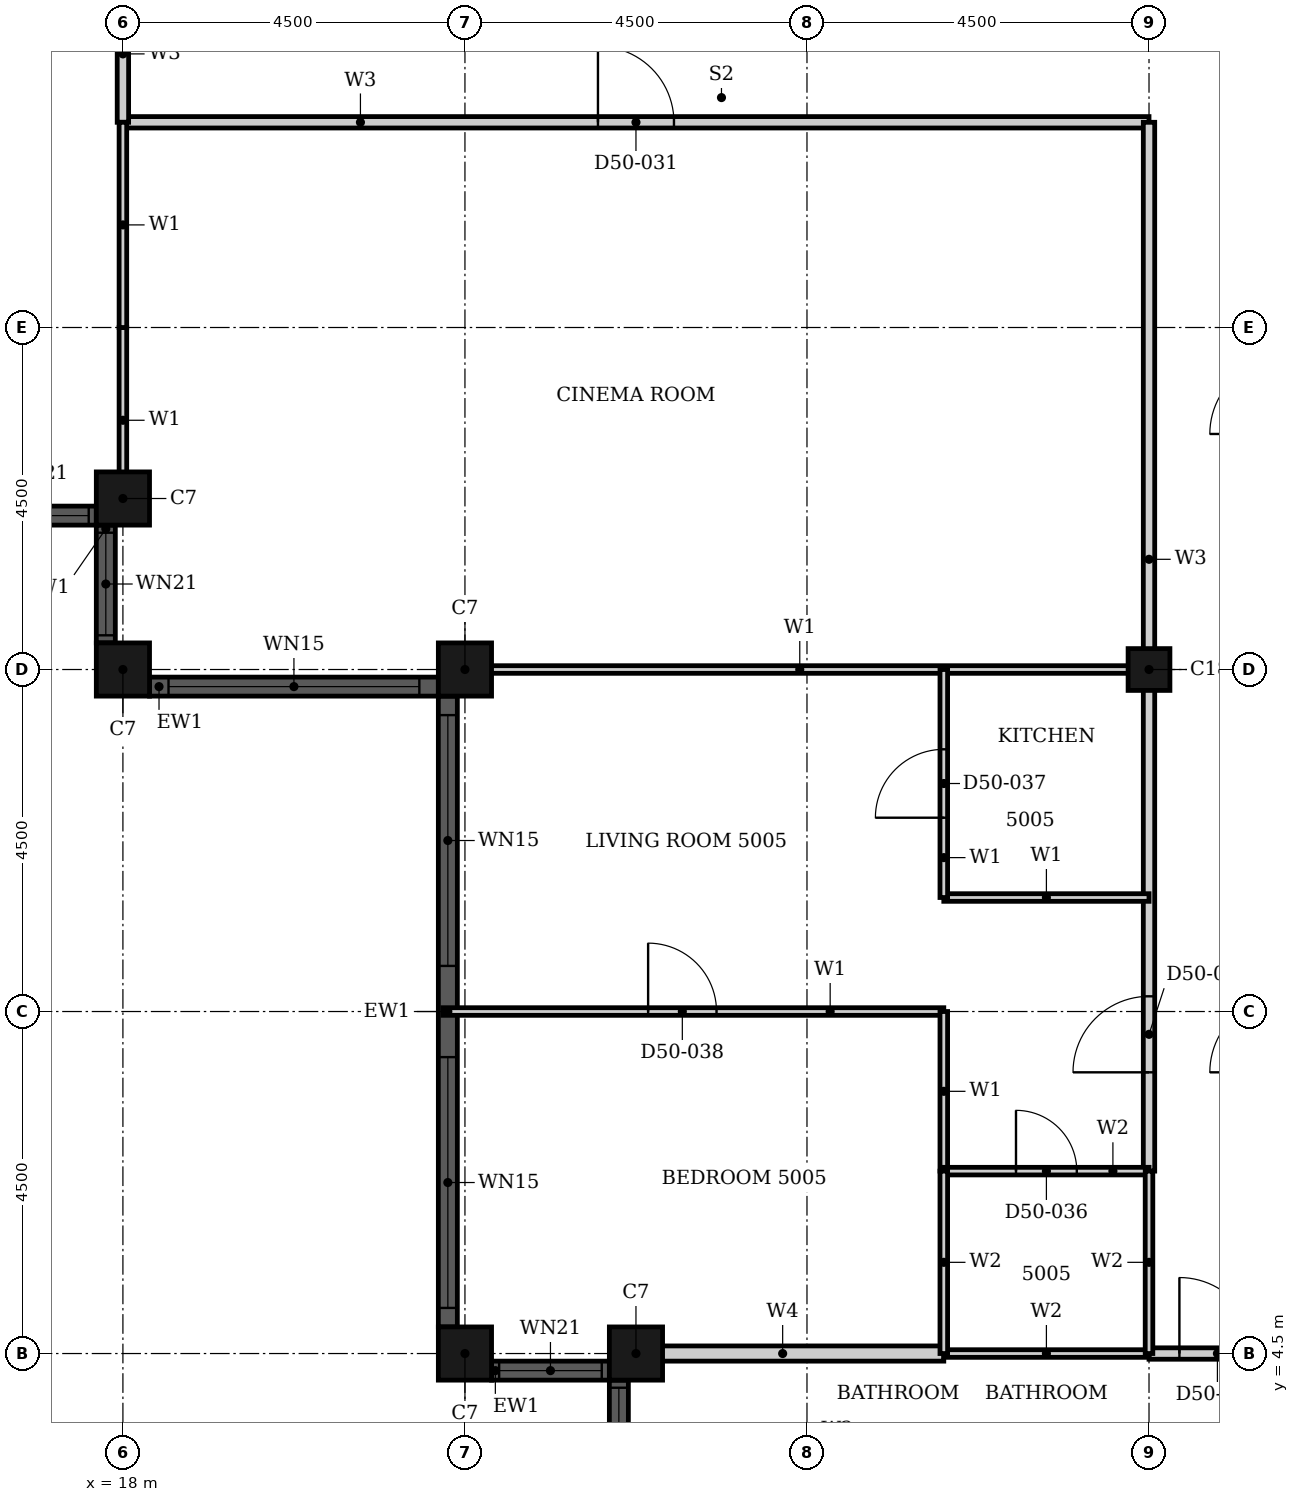
"""IFC4 building model, lengths in metres.
Left out: names, types, materials, properties, quantities, classifications, styles, units other than length and angle.
Written with IfcOpenShell. Run it as: python <this file> out.ifc"""

import sys

from ifc_helpers import new_model, si_unit, direction, frame, frame_2d, origin, origin_2d, place, context, subcontext, project, spatial, rectangle, hollow_rectangle, extrude, element, fill, save


model = new_model("IFC4")
c1 = context("Model", 3, precision=1e-05, world=origin(), true_north=direction((0.0, 1.0)))
c2 = subcontext(c1, "Body", "Model", "MODEL_VIEW")
j1 = project(units=[si_unit("LENGTHUNIT", "METRE"), si_unit("PLANEANGLEUNIT", "RADIAN")], contexts=[c1])
p1 = place(None, origin())
s1 = spatial("IfcSite", under=j1, at=p1, CompositionType="ELEMENT")
p2 = place(p1, origin())
s2 = spatial("IfcBuilding", under=s1, at=p2, CompositionType="ELEMENT")
p3 = place(p2, frame((0.0, 0.0, 199.8)))
s3 = spatial("IfcBuildingStorey", under=s2, at=p3, CompositionType="ELEMENT", Elevation=199.8)
for number, where, z_axis, x_axis in (
    (1, (18.0, 15.75, 0.0), (0.0, 0.0, 1.0), (1.0, 0.0, 0.0)),
    (2, (18.0, 13.5, 0.0), (0.0, 0.0, 1.0), (1.0, 0.0, 0.0)),
    (3, (22.5, 13.5, 0.0), (0.0, 0.0, 1.0), (1.0, 0.0, 0.0)),
    (4, (22.5, 4.5, 0.0), (0.0, 0.0, 1.0), (1.0, 0.0, 0.0)),
    (5, (24.75, 4.5, 0.0), (0.0, 0.0, 1.0), (1.0, 0.0, 0.0)),
):
    element("IfcColumn", number, at=place(p3, frame(where, z_axis=z_axis, x_axis=x_axis)), inside=s3, PredefinedType="COLUMN", context=c2, shape_type="SweptSolid", body=[
        extrude(hollow_rectangle(XDim=0.7, YDim=0.7, WallThickness=0.022, at=origin_2d()), origin(), (0.0, 0.0, 1.0), 3.7),
    ])
p4 = place(p3, frame((31.5, 13.5, 0.0), z_axis=(0.0, 0.0, 1.0), x_axis=(1.0, 0.0, 0.0)))
e6 = element("IfcColumn", 6, at=p4, inside=s3, PredefinedType="COLUMN", context=c2, shape_type="SweptSolid", body=[
    extrude(hollow_rectangle(XDim=0.55, YDim=0.55, WallThickness=0.018, at=origin_2d()), origin(), (0.0, 0.0, 1.0), 3.7),
])
p5 = place(p3, frame((16.1, 15.525, 0.0), z_axis=(0.0, 0.0, 1.0), x_axis=(1.0, 0.0, 0.0)))
e7 = element("IfcWall", 7, at=p5, inside=s3, PredefinedType="SOLIDWALL", context=c2, shape_type="SweptSolid", body=[
    extrude(rectangle(XDim=1.55, YDim=0.25, at=frame_2d((0.775, 0.0))), origin(), (0.0, 0.0, 1.0), 3.7),
])
p6 = place(p5, frame((0.1, 0.0, 0.9)))
e8 = element("IfcOpeningElement", 8, at=p6, cuts=e7, PredefinedType="OPENING", context=c2, shape_type="SweptSolid", body=[
    extrude(rectangle(XDim=1.35, YDim=1.85, at=frame_2d((0.675, 0.925))), frame((0.0, 0.135, 0.0), z_axis=(0.0, -1.0, 0.0), x_axis=(1.0, 0.0, 0.0)), (0.0, 0.0, 1.0), 0.27),
])
p7 = place(p3, frame((17.775, 15.4, 0.0), z_axis=(0.0, 0.0, 1.0), x_axis=(0.0, -1.0, 0.0)))
e9 = element("IfcWall", 9, at=p7, inside=s3, PredefinedType="SOLIDWALL", context=c2, shape_type="SweptSolid", body=[
    extrude(rectangle(XDim=1.55, YDim=0.25, at=frame_2d((0.775, 0.0))), origin(), (0.0, 0.0, 1.0), 3.7),
])
p8 = place(p7, frame((0.1, 0.0, 0.9)))
e10 = element("IfcOpeningElement", 10, at=p8, cuts=e9, PredefinedType="OPENING", context=c2, shape_type="SweptSolid", body=[
    extrude(rectangle(XDim=1.35, YDim=1.85, at=frame_2d((0.675, 0.925))), frame((0.0, 0.135, 0.0), z_axis=(0.0, -1.0, 0.0), x_axis=(1.0, 0.0, 0.0)), (0.0, 0.0, 1.0), 0.27),
])
p9 = place(p3, frame((18.35, 13.275, 0.0), z_axis=(0.0, 0.0, 1.0), x_axis=(1.0, 0.0, 0.0)))
e11 = element("IfcWall", 11, at=p9, inside=s3, PredefinedType="SOLIDWALL", context=c2, shape_type="SweptSolid", body=[
    extrude(rectangle(XDim=3.8, YDim=0.25, at=frame_2d((1.9, 0.0))), origin(), (0.0, 0.0, 1.0), 3.7),
])
p10 = place(p9, frame((0.25, 0.0, 0.45)))
e12 = element("IfcOpeningElement", 12, at=p10, cuts=e11, PredefinedType="OPENING", context=c2, shape_type="SweptSolid", body=[
    extrude(rectangle(XDim=3.3, YDim=2.3, at=frame_2d((1.65, 1.15))), frame((0.0, 0.135, 0.0), z_axis=(0.0, -1.0, 0.0), x_axis=(1.0, 0.0, 0.0)), (0.0, 0.0, 1.0), 0.27),
])
p11 = place(p3, frame((22.275, 13.15, 0.0), z_axis=(0.0, 0.0, 1.0), x_axis=(0.0, -1.0, 0.0)))
e13 = element("IfcWall", 13, at=p11, inside=s3, PredefinedType="SOLIDWALL", context=c2, shape_type="SweptSolid", body=[
    extrude(rectangle(XDim=8.3, YDim=0.25, at=frame_2d((4.15, 0.0))), origin(), (0.0, 0.0, 1.0), 3.7),
])
p12 = place(p11, frame((0.25, 0.0, 0.45)))
e14 = element("IfcOpeningElement", 14, at=p12, cuts=e13, PredefinedType="OPENING", context=c2, shape_type="SweptSolid", body=[
    extrude(rectangle(XDim=3.3, YDim=2.3, at=frame_2d((1.65, 1.15))), frame((0.0, 0.135, 0.0), z_axis=(0.0, -1.0, 0.0), x_axis=(1.0, 0.0, 0.0)), (0.0, 0.0, 1.0), 0.27),
])
p13 = place(p11, frame((4.75, 0.0, 0.45)))
e15 = element("IfcOpeningElement", 15, at=p13, cuts=e13, PredefinedType="OPENING", context=c2, shape_type="SweptSolid", body=[
    extrude(rectangle(XDim=3.3, YDim=2.3, at=frame_2d((1.65, 1.15))), frame((0.0, 0.135, 0.0), z_axis=(0.0, -1.0, 0.0), x_axis=(1.0, 0.0, 0.0)), (0.0, 0.0, 1.0), 0.27),
])
p14 = place(p3, frame((22.85, 4.275, 0.0), z_axis=(0.0, 0.0, 1.0), x_axis=(1.0, 0.0, 0.0)))
e16 = element("IfcWall", 16, at=p14, inside=s3, PredefinedType="SOLIDWALL", context=c2, shape_type="SweptSolid", body=[
    extrude(rectangle(XDim=1.55, YDim=0.25, at=frame_2d((0.775, 0.0))), origin(), (0.0, 0.0, 1.0), 3.7),
])
p15 = place(p14, frame((0.1, 0.0, 0.9)))
e17 = element("IfcOpeningElement", 17, at=p15, cuts=e16, PredefinedType="OPENING", context=c2, shape_type="SweptSolid", body=[
    extrude(rectangle(XDim=1.35, YDim=1.85, at=frame_2d((0.675, 0.925))), frame((0.0, 0.135, 0.0), z_axis=(0.0, -1.0, 0.0), x_axis=(1.0, 0.0, 0.0)), (0.0, 0.0, 1.0), 0.27),
])
p16 = place(p3, frame((24.525, 4.15, 0.0), z_axis=(0.0, 0.0, 1.0), x_axis=(0.0, -1.0, 0.0)))
e18 = element("IfcWall", 18, at=p16, inside=s3, PredefinedType="SOLIDWALL", context=c2, shape_type="SweptSolid", body=[
    extrude(rectangle(XDim=1.55, YDim=0.25, at=frame_2d((0.775, 0.0))), origin(), (0.0, 0.0, 1.0), 3.7),
])
p17 = place(p16, frame((0.1, 0.0, 0.9)))
e19 = element("IfcOpeningElement", 19, at=p17, cuts=e18, PredefinedType="OPENING", context=c2, shape_type="SweptSolid", body=[
    extrude(rectangle(XDim=1.35, YDim=1.85, at=frame_2d((0.675, 0.925))), frame((0.0, 0.135, 0.0), z_axis=(0.0, -1.0, 0.0), x_axis=(1.0, 0.0, 0.0)), (0.0, 0.0, 1.0), 0.27),
])
p18 = place(p3, frame((18.0, 20.7, 0.0), z_axis=(0.0, 0.0, 1.0), x_axis=(1.0, 0.0, 0.0)))
e20 = element("IfcWall", 20, at=p18, inside=s3, PredefinedType="PARTITIONING", context=c2, shape_type="SweptSolid", body=[
    extrude(rectangle(XDim=13.5, YDim=0.15, at=frame_2d((6.75, 0.0))), origin(), (0.0, 0.0, 1.0), 3.4),
])
p19 = place(p18, frame((6.25, 0.0, 0.0)))
e21 = element("IfcOpeningElement", 21, at=p19, cuts=e20, PredefinedType="OPENING", context=c2, shape_type="SweptSolid", body=[
    extrude(rectangle(XDim=1.0, YDim=2.1, at=frame_2d((0.5, 1.05))), frame((0.0, 0.085, 0.0), z_axis=(0.0, -1.0, 0.0), x_axis=(1.0, 0.0, 0.0)), (0.0, 0.0, 1.0), 0.17),
])
p20 = place(p3, frame((31.5, 4.5, 0.0), z_axis=(0.0, 0.0, 1.0), x_axis=(1.0, 0.0, 0.0)))
e22 = element("IfcWall", 22, at=p20, inside=s3, PredefinedType="PARTITIONING", context=c2, shape_type="SweptSolid", body=[
    extrude(rectangle(XDim=1.8, YDim=0.15, at=frame_2d((0.9, 0.0))), origin(), (0.0, 0.0, 1.0), 3.4),
])
p21 = place(p20, frame((0.4, 0.0, 0.0)))
e23 = element("IfcOpeningElement", 23, at=p21, cuts=e22, PredefinedType="OPENING", context=c2, shape_type="SweptSolid", body=[
    extrude(rectangle(XDim=1.0, YDim=2.2, at=frame_2d((0.5, 1.1))), frame((0.0, 0.085, 0.0), z_axis=(0.0, -1.0, 0.0), x_axis=(1.0, 0.0, 0.0)), (0.0, 0.0, 1.0), 0.17),
])
p22 = place(p3, frame((18.0, 20.7, 0.0), z_axis=(0.0, 0.0, 1.0), x_axis=(0.0, 1.0, 0.0)))
e24 = element("IfcWall", 24, at=p22, inside=s3, PredefinedType="PARTITIONING", context=c2, shape_type="SweptSolid", body=[
    extrude(rectangle(XDim=1.8, YDim=0.15, at=frame_2d((0.9, 0.0))), origin(), (0.0, 0.0, 1.0), 3.4),
])
p23 = place(p3, frame((31.5, 6.9, 0.0), z_axis=(0.0, 0.0, 1.0), x_axis=(0.0, 1.0, 0.0)))
e25 = element("IfcWall", 25, at=p23, inside=s3, PredefinedType="PARTITIONING", context=c2, shape_type="SweptSolid", body=[
    extrude(rectangle(XDim=13.8, YDim=0.15, at=frame_2d((6.9, 0.0))), origin(), (0.0, 0.0, 1.0), 2.68),
])
p24 = place(p23, frame((1.3, 0.0, 0.0)))
e26 = element("IfcOpeningElement", 26, at=p24, cuts=e25, PredefinedType="OPENING", context=c2, shape_type="SweptSolid", body=[
    extrude(rectangle(XDim=1.0, YDim=2.2, at=frame_2d((0.5, 1.1))), frame((0.0, 0.085, 0.0), z_axis=(0.0, -1.0, 0.0), x_axis=(1.0, 0.0, 0.0)), (0.0, 0.0, 1.0), 0.17),
])
p25 = place(p3, frame((28.8, 10.5, 0.0), z_axis=(0.0, 0.0, 1.0), x_axis=(1.0, 0.0, 0.0)))
e27 = element("IfcWall", 27, at=p25, inside=s3, PredefinedType="PARTITIONING", context=c2, shape_type="SweptSolid", body=[
    extrude(rectangle(XDim=2.7, YDim=0.1, at=frame_2d((1.35, 0.0))), origin(), (0.0, 0.0, 1.0), 3.4),
])
p26 = place(p3, frame((22.31, 13.5, 0.0), z_axis=(0.0, 0.0, 1.0), x_axis=(1.0, 0.0, 0.0)))
e28 = element("IfcWall", 28, at=p26, inside=s3, PredefinedType="PARTITIONING", context=c2, shape_type="SweptSolid", body=[
    extrude(rectangle(XDim=9.19, YDim=0.1, at=frame_2d((4.595, 0.0))), origin(), (0.0, 0.0, 1.0), 2.48),
])
p27 = place(p3, frame((22.21, 9.0, 0.0), z_axis=(0.0, 0.0, 1.0), x_axis=(1.0, 0.0, 0.0)))
e29 = element("IfcWall", 29, at=p27, inside=s3, PredefinedType="PARTITIONING", context=c2, shape_type="SweptSolid", body=[
    extrude(rectangle(XDim=6.59, YDim=0.1, at=frame_2d((3.295, 0.0))), origin(), (0.0, 0.0, 1.0), 3.4),
])
p28 = place(p27, frame((2.7, 0.0, 0.0)))
e30 = element("IfcOpeningElement", 30, at=p28, cuts=e29, PredefinedType="OPENING", context=c2, shape_type="SweptSolid", body=[
    extrude(rectangle(XDim=0.9, YDim=2.1, at=frame_2d((0.45, 1.05))), frame((0.0, 0.06, 0.0), z_axis=(0.0, -1.0, 0.0), x_axis=(1.0, 0.0, 0.0)), (0.0, 0.0, 1.0), 0.12),
])
p29 = place(p3, frame((18.0, 15.56, 0.0), z_axis=(0.0, 0.0, 1.0), x_axis=(0.0, 1.0, 0.0)))
e31 = element("IfcWall", 31, at=p29, inside=s3, PredefinedType="PARTITIONING", context=c2, shape_type="SweptSolid", body=[
    extrude(rectangle(XDim=2.439, YDim=0.1, at=frame_2d((1.219, 0.0))), origin(), (0.0, 0.0, 1.0), 3.4),
])
p30 = place(p3, frame((18.0, 18.0, 0.0), z_axis=(0.0, 0.0, 1.0), x_axis=(0.0, 1.0, 0.0)))
e32 = element("IfcWall", 32, at=p30, inside=s3, PredefinedType="PARTITIONING", context=c2, shape_type="SweptSolid", body=[
    extrude(rectangle(XDim=2.7, YDim=0.1, at=frame_2d((1.35, 0.0))), origin(), (0.0, 0.0, 1.0), 3.4),
])
p31 = place(p3, frame((28.8, 6.9, 0.0), z_axis=(0.0, 0.0, 1.0), x_axis=(0.0, 1.0, 0.0)))
e33 = element("IfcWall", 33, at=p31, inside=s3, PredefinedType="PARTITIONING", context=c2, shape_type="SweptSolid", body=[
    extrude(rectangle(XDim=2.1, YDim=0.1, at=frame_2d((1.05, 0.0))), origin(), (0.0, 0.0, 1.0), 3.4),
])
p32 = place(p3, frame((28.8, 10.5, 0.0), z_axis=(0.0, 0.0, 1.0), x_axis=(0.0, 1.0, 0.0)))
e34 = element("IfcWall", 34, at=p32, inside=s3, PredefinedType="PARTITIONING", context=c2, shape_type="SweptSolid", body=[
    extrude(rectangle(XDim=3.0, YDim=0.1, at=frame_2d((1.5, 0.0))), origin(), (0.0, 0.0, 1.0), 3.4),
])
p33 = place(p32, frame((1.05, 0.0, 0.0)))
e35 = element("IfcOpeningElement", 35, at=p33, cuts=e34, PredefinedType="OPENING", context=c2, shape_type="SweptSolid", body=[
    extrude(rectangle(XDim=0.9, YDim=2.1, at=frame_2d((0.45, 1.05))), frame((0.0, 0.06, 0.0), z_axis=(0.0, -1.0, 0.0), x_axis=(1.0, 0.0, 0.0)), (0.0, 0.0, 1.0), 0.12),
])
p34 = place(p3, frame((24.56, 4.5, 0.0), z_axis=(0.0, 0.0, 1.0), x_axis=(1.0, 0.0, 0.0)))
e36 = element("IfcWall", 36, at=p34, inside=s3, PredefinedType="PARTITIONING", context=c2, shape_type="SweptSolid", body=[
    extrude(rectangle(XDim=4.24, YDim=0.2, at=frame_2d((2.12, 0.0))), origin(), (0.0, 0.0, 1.0), 3.4),
])
p35 = place(p3, frame((28.8, 4.5, 0.0), z_axis=(0.0, 0.0, 1.0), x_axis=(1.0, 0.0, 0.0)))
e37 = element("IfcWall", 37, at=p35, inside=s3, PredefinedType="PARTITIONING", context=c2, shape_type="SweptSolid", body=[
    extrude(rectangle(XDim=2.7, YDim=0.1, at=frame_2d((1.35, 0.0))), origin(), (0.0, 0.0, 1.0), 3.4),
])
p36 = place(p3, frame((28.8, 6.9, 0.0), z_axis=(0.0, 0.0, 1.0), x_axis=(1.0, 0.0, 0.0)))
e38 = element("IfcWall", 38, at=p36, inside=s3, PredefinedType="PARTITIONING", context=c2, shape_type="SweptSolid", body=[
    extrude(rectangle(XDim=2.7, YDim=0.1, at=frame_2d((1.35, 0.0))), origin(), (0.0, 0.0, 1.0), 3.4),
])
p37 = place(p36, frame((0.95, 0.0, 0.0)))
e39 = element("IfcOpeningElement", 39, at=p37, cuts=e38, PredefinedType="OPENING", context=c2, shape_type="SweptSolid", body=[
    extrude(rectangle(XDim=0.8, YDim=2.1, at=frame_2d((0.4, 1.05))), frame((0.0, 0.06, 0.0), z_axis=(0.0, -1.0, 0.0), x_axis=(1.0, 0.0, 0.0)), (0.0, 0.0, 1.0), 0.12),
])
p38 = place(p3, frame((28.8, 4.5, 0.0), z_axis=(0.0, 0.0, 1.0), x_axis=(0.0, 1.0, 0.0)))
e40 = element("IfcWall", 40, at=p38, inside=s3, PredefinedType="PARTITIONING", context=c2, shape_type="SweptSolid", body=[
    extrude(rectangle(XDim=2.4, YDim=0.1, at=frame_2d((1.2, 0.0))), origin(), (0.0, 0.0, 1.0), 3.4),
])
p39 = place(p3, frame((31.5, 4.5, 0.0), z_axis=(0.0, 0.0, 1.0), x_axis=(0.0, 1.0, 0.0)))
e41 = element("IfcWall", 41, at=p39, inside=s3, PredefinedType="PARTITIONING", context=c2, shape_type="SweptSolid", body=[
    extrude(rectangle(XDim=2.4, YDim=0.1, at=frame_2d((1.2, 0.0))), origin(), (0.0, 0.0, 1.0), 2.68),
])
p40 = place(p6, origin())
e42 = element("IfcWindow", 42, at=p40, inside=s3, PartitioningType="SINGLE_PANEL", PredefinedType="WINDOW", context=c2, shape_type="SweptSolid", body=[
    extrude(rectangle(XDim=1.35, YDim=1.85, at=frame_2d((0.675, 0.925))), frame((0.0, 0.03, 0.0), z_axis=(0.0, -1.0, 0.0), x_axis=(1.0, 0.0, 0.0)), (0.0, 0.0, 1.0), 0.06),
])
fill(e8, e42)
p41 = place(p8, origin())
e43 = element("IfcWindow", 43, at=p41, inside=s3, PartitioningType="SINGLE_PANEL", PredefinedType="WINDOW", context=c2, shape_type="SweptSolid", body=[
    extrude(rectangle(XDim=1.35, YDim=1.85, at=frame_2d((0.675, 0.925))), frame((0.0, 0.03, 0.0), z_axis=(0.0, -1.0, 0.0), x_axis=(1.0, 0.0, 0.0)), (0.0, 0.0, 1.0), 0.06),
])
fill(e10, e43)
p42 = place(p10, origin())
e44 = element("IfcWindow", 44, at=p42, inside=s3, PartitioningType="SINGLE_PANEL", PredefinedType="WINDOW", context=c2, shape_type="SweptSolid", body=[
    extrude(rectangle(XDim=3.3, YDim=2.3, at=frame_2d((1.65, 1.15))), frame((0.0, 0.03, 0.0), z_axis=(0.0, -1.0, 0.0), x_axis=(1.0, 0.0, 0.0)), (0.0, 0.0, 1.0), 0.06),
])
fill(e12, e44)
p43 = place(p12, origin())
e45 = element("IfcWindow", 45, at=p43, inside=s3, PartitioningType="SINGLE_PANEL", PredefinedType="WINDOW", context=c2, shape_type="SweptSolid", body=[
    extrude(rectangle(XDim=3.3, YDim=2.3, at=frame_2d((1.65, 1.15))), frame((0.0, 0.03, 0.0), z_axis=(0.0, -1.0, 0.0), x_axis=(1.0, 0.0, 0.0)), (0.0, 0.0, 1.0), 0.06),
])
fill(e14, e45)
p44 = place(p13, origin())
e46 = element("IfcWindow", 46, at=p44, inside=s3, PartitioningType="SINGLE_PANEL", PredefinedType="WINDOW", context=c2, shape_type="SweptSolid", body=[
    extrude(rectangle(XDim=3.3, YDim=2.3, at=frame_2d((1.65, 1.15))), frame((0.0, 0.03, 0.0), z_axis=(0.0, -1.0, 0.0), x_axis=(1.0, 0.0, 0.0)), (0.0, 0.0, 1.0), 0.06),
])
fill(e15, e46)
p45 = place(p15, origin())
e47 = element("IfcWindow", 47, at=p45, inside=s3, PartitioningType="SINGLE_PANEL", PredefinedType="WINDOW", context=c2, shape_type="SweptSolid", body=[
    extrude(rectangle(XDim=1.35, YDim=1.85, at=frame_2d((0.675, 0.925))), frame((0.0, 0.03, 0.0), z_axis=(0.0, -1.0, 0.0), x_axis=(1.0, 0.0, 0.0)), (0.0, 0.0, 1.0), 0.06),
])
fill(e17, e47)
p46 = place(p17, origin())
e48 = element("IfcWindow", 48, at=p46, inside=s3, PartitioningType="SINGLE_PANEL", PredefinedType="WINDOW", context=c2, shape_type="SweptSolid", body=[
    extrude(rectangle(XDim=1.35, YDim=1.85, at=frame_2d((0.675, 0.925))), frame((0.0, 0.03, 0.0), z_axis=(0.0, -1.0, 0.0), x_axis=(1.0, 0.0, 0.0)), (0.0, 0.0, 1.0), 0.06),
])
fill(e19, e48)
p47 = place(p19, origin())
e49 = element("IfcDoor", 49, at=p47, inside=s3, OperationType="SINGLE_SWING_LEFT", PredefinedType="DOOR", context=c2, shape_type="SweptSolid", body=[
    extrude(rectangle(XDim=1.0, YDim=2.1, at=frame_2d((0.5, 1.05))), frame((0.0, 0.025, 0.0), z_axis=(0.0, -1.0, 0.0), x_axis=(1.0, 0.0, 0.0)), (0.0, 0.0, 1.0), 0.05),
])
fill(e21, e49)
p48 = place(p24, origin())
e50 = element("IfcDoor", 50, at=p48, inside=s3, OperationType="SINGLE_SWING_LEFT", PredefinedType="DOOR", context=c2, shape_type="SweptSolid", body=[
    extrude(rectangle(XDim=1.0, YDim=2.2, at=frame_2d((0.5, 1.1))), frame((0.0, 0.025, 0.0), z_axis=(0.0, -1.0, 0.0), x_axis=(1.0, 0.0, 0.0)), (0.0, 0.0, 1.0), 0.05),
])
fill(e26, e50)
p49 = place(p37, origin())
e51 = element("IfcDoor", 51, at=p49, inside=s3, OperationType="SINGLE_SWING_LEFT", PredefinedType="DOOR", context=c2, shape_type="SweptSolid", body=[
    extrude(rectangle(XDim=0.8, YDim=2.1, at=frame_2d((0.4, 1.05))), frame((0.0, 0.025, 0.0), z_axis=(0.0, -1.0, 0.0), x_axis=(1.0, 0.0, 0.0)), (0.0, 0.0, 1.0), 0.05),
])
fill(e39, e51)
p50 = place(p33, origin())
e52 = element("IfcDoor", 52, at=p50, inside=s3, OperationType="SINGLE_SWING_LEFT", PredefinedType="DOOR", context=c2, shape_type="SweptSolid", body=[
    extrude(rectangle(XDim=0.9, YDim=2.1, at=frame_2d((0.45, 1.05))), frame((0.0, 0.025, 0.0), z_axis=(0.0, -1.0, 0.0), x_axis=(1.0, 0.0, 0.0)), (0.0, 0.0, 1.0), 0.05),
])
fill(e35, e52)
p51 = place(p28, origin())
e53 = element("IfcDoor", 53, at=p51, inside=s3, OperationType="SINGLE_SWING_LEFT", PredefinedType="DOOR", context=c2, shape_type="SweptSolid", body=[
    extrude(rectangle(XDim=0.9, YDim=2.1, at=frame_2d((0.45, 1.05))), frame((0.0, 0.025, 0.0), z_axis=(0.0, -1.0, 0.0), x_axis=(1.0, 0.0, 0.0)), (0.0, 0.0, 1.0), 0.05),
])
fill(e30, e53)
p52 = place(p21, origin())
e54 = element("IfcDoor", 54, at=p52, inside=s3, OperationType="SINGLE_SWING_RIGHT", PredefinedType="DOOR", context=c2, shape_type="SweptSolid", body=[
    extrude(rectangle(XDim=1.0, YDim=2.2, at=frame_2d((0.5, 1.1))), frame((0.0, 0.025, 0.0), z_axis=(0.0, -1.0, 0.0), x_axis=(1.0, 0.0, 0.0)), (0.0, 0.0, 1.0), 0.05),
])
fill(e23, e54)
save(model, sys.argv[1])
